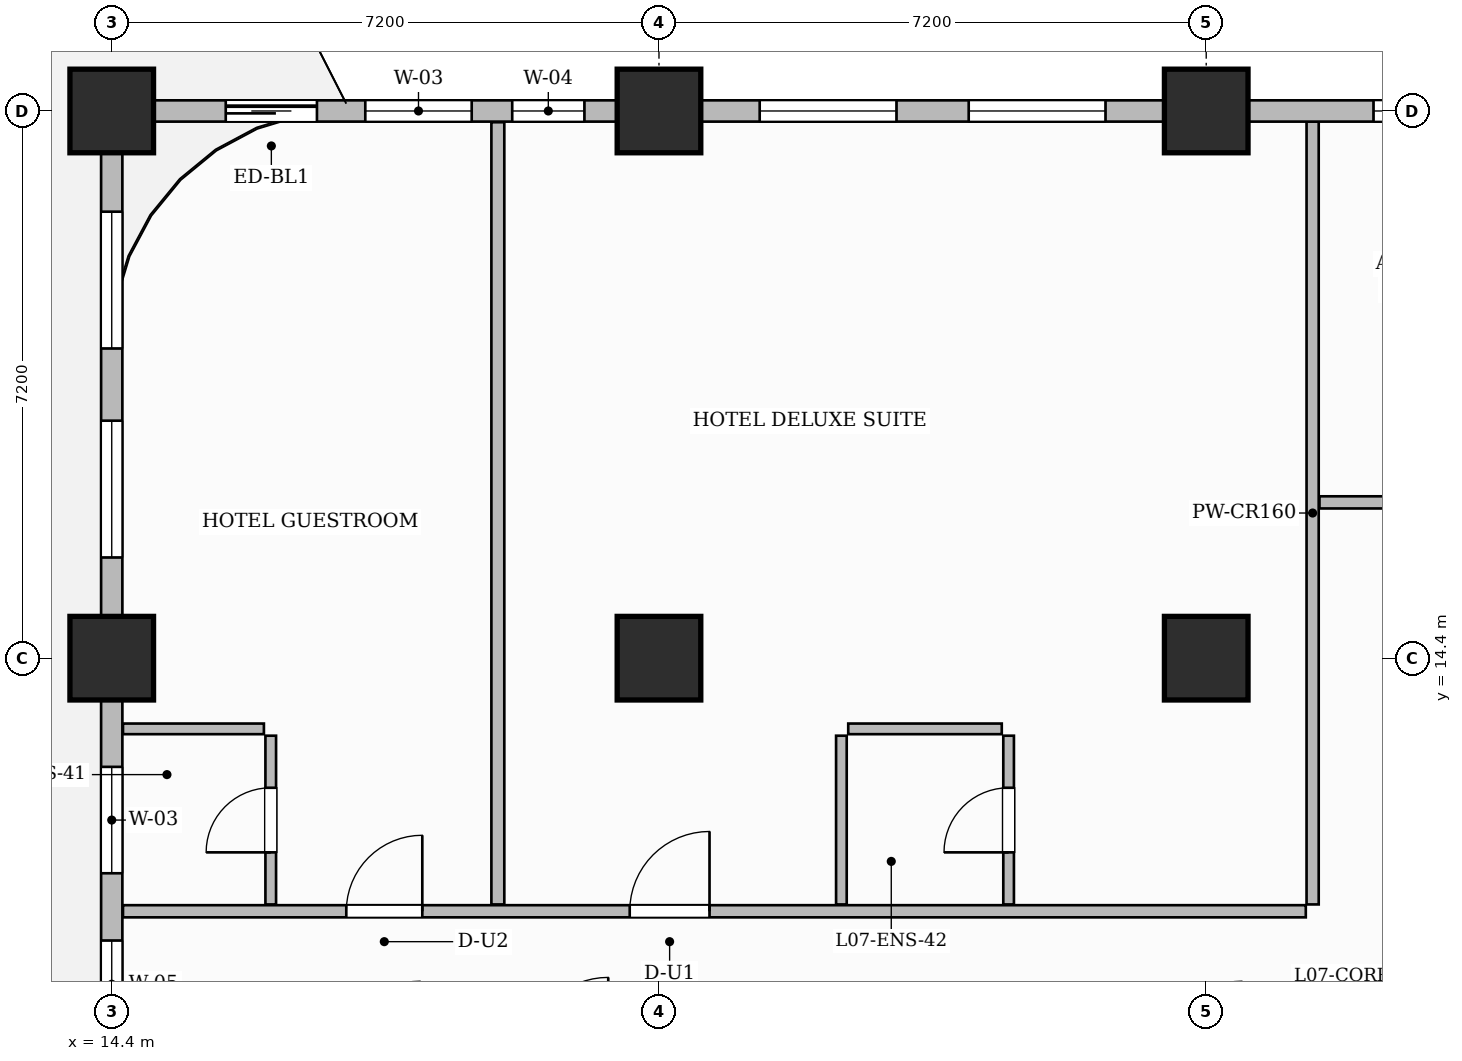
"""IFC4 building model, lengths in metres.
Left out: names, types, materials, properties, quantities, classifications, styles, units other than length and angle.
Written with IfcOpenShell. Run it as: python <this file> out.ifc"""

import sys

from ifc_helpers import new_model, si_unit, direction, frame, frame_2d, origin, origin_2d, place, context, subcontext, project, spatial, rectangle, extrude, source, transform, mapped, element, fill, save


model = new_model("IFC4")
c1 = context("Model", 3, precision=1e-05, world=origin(), true_north=direction((0.0, 1.0)))
c2 = subcontext(c1, "Body", "Model", "MODEL_VIEW")
j1 = project(units=[si_unit("LENGTHUNIT", "METRE"), si_unit("PLANEANGLEUNIT", "RADIAN")], contexts=[c1])
p1 = place(None, origin())
s1 = spatial("IfcSite", under=j1, at=p1, CompositionType="ELEMENT")
p2 = place(p1, origin())
s2 = spatial("IfcBuilding", under=s1, at=p2, CompositionType="ELEMENT")
p3 = place(p2, frame((0.0, 0.0, 36.1)))
s3 = spatial("IfcBuildingStorey", under=s2, at=p3, CompositionType="ELEMENT", Elevation=36.1)
m1 = source(origin(), c2, "Body", "SweptSolid", [
    extrude(rectangle(XDim=1.1, YDim=1.1, at=origin_2d()), origin(), (0.0, 0.0, 1.0), 3.7),
])
for number, where, z_axis, x_axis in (
    (1, (14.4, 14.4, 0.0), (0.0, 0.0, 1.0), (1.0, 0.0, 0.0)),
    (2, (14.4, 21.6, 0.0), (0.0, 0.0, 1.0), (1.0, 0.0, 0.0)),
    (3, (21.6, 14.4, 0.0), (0.0, 0.0, 1.0), (1.0, 0.0, 0.0)),
    (4, (21.6, 21.6, 0.0), (0.0, 0.0, 1.0), (1.0, 0.0, 0.0)),
    (5, (28.8, 14.4, 0.0), (0.0, 0.0, 1.0), (1.0, 0.0, 0.0)),
    (6, (28.8, 21.6, 0.0), (0.0, 0.0, 1.0), (1.0, 0.0, 0.0)),
):
    element("IfcColumn", number, at=place(p3, frame(where, z_axis=z_axis, x_axis=x_axis)), inside=s3, PredefinedType="COLUMN", context=c2, shape_type="MappedRepresentation", body=[
        mapped(m1, transform((0.0, 0.0, 0.0), scale=1.0)),
    ])
p4 = place(p3, frame((14.548, 11.07, 0.0), z_axis=(0.0, 0.0, 1.0), x_axis=(1.0, 0.0, 0.0)))
e7 = element("IfcWall", 7, at=p4, inside=s3, PredefinedType="PARTITIONING", context=c2, shape_type="SweptSolid", body=[
    extrude(rectangle(XDim=15.562, YDim=0.16, at=frame_2d((7.781, 0.0))), origin(), (0.0, 0.0, 1.0), 3.45),
])
p5 = place(p4, frame((2.938, 0.0, 0.0)))
e8 = element("IfcOpeningElement", 8, at=p5, cuts=e7, PredefinedType="OPENING", context=c2, shape_type="SweptSolid", body=[
    extrude(rectangle(XDim=1.0, YDim=2.2, at=frame_2d((0.5, 1.1))), frame((0.0, 0.09, 0.0), z_axis=(0.0, -1.0, 0.0), x_axis=(1.0, 0.0, 0.0)), (0.0, 0.0, 1.0), 0.18),
])
p6 = place(p4, frame((6.667, 0.0, 0.0)))
e9 = element("IfcOpeningElement", 9, at=p6, cuts=e7, PredefinedType="OPENING", context=c2, shape_type="SweptSolid", body=[
    extrude(rectangle(XDim=1.05, YDim=2.25, at=frame_2d((0.525, 1.125))), frame((0.0, 0.09, 0.0), z_axis=(0.0, -1.0, 0.0), x_axis=(1.0, 0.0, 0.0)), (0.0, 0.0, 1.0), 0.18),
])
p7 = place(p3, frame((30.2, 11.16, 0.0), z_axis=(0.0, 0.0, 1.0), x_axis=(0.0, 1.0, 0.0)))
e10 = element("IfcWall", 10, at=p7, inside=s3, PredefinedType="PARTITIONING", context=c2, shape_type="SweptSolid", body=[
    extrude(rectangle(XDim=10.3, YDim=0.16, at=frame_2d((5.15, 0.0))), origin(), (0.0, 0.0, 1.0), 3.45),
])
p8 = place(p3, frame((30.29, 16.45, 0.0), z_axis=(0.0, 0.0, 1.0), x_axis=(1.0, 0.0, 0.0)))
e11 = element("IfcWall", 11, at=p8, inside=s3, PredefinedType="PARTITIONING", context=c2, shape_type="SweptSolid", body=[
    extrude(rectangle(XDim=19.37, YDim=0.16, at=frame_2d((9.685, 0.0))), origin(), (0.0, 0.0, 1.0), 3.45),
])
p9 = place(p8, frame((1.185, 0.0, 0.0)))
e12 = element("IfcOpeningElement", 12, at=p9, cuts=e11, PredefinedType="OPENING", context=c2, shape_type="SweptSolid", body=[
    extrude(rectangle(XDim=0.85, YDim=2.1, at=frame_2d((0.425, 1.05))), frame((0.0, 0.09, 0.0), z_axis=(0.0, -1.0, 0.0), x_axis=(1.0, 0.0, 0.0)), (0.0, 0.0, 1.0), 0.18),
])
p10 = place(p8, frame((6.66, 0.0, 0.0)))
e13 = element("IfcOpeningElement", 13, at=p10, cuts=e11, PredefinedType="OPENING", context=c2, shape_type="SweptSolid", body=[
    extrude(rectangle(XDim=0.9, YDim=2.15, at=frame_2d((0.45, 1.075))), frame((0.0, 0.09, 0.0), z_axis=(0.0, -1.0, 0.0), x_axis=(1.0, 0.0, 0.0)), (0.0, 0.0, 1.0), 0.18),
])
p11 = place(p8, frame((14.46, 0.0, 0.0)))
e14 = element("IfcOpeningElement", 14, at=p11, cuts=e11, PredefinedType="OPENING", context=c2, shape_type="SweptSolid", body=[
    extrude(rectangle(XDim=1.4, YDim=2.35, at=frame_2d((0.7, 1.175))), frame((0.0, 0.09, 0.0), z_axis=(0.0, -1.0, 0.0), x_axis=(1.0, 0.0, 0.0)), (0.0, 0.0, 1.0), 0.18),
])
p12 = place(p3, frame((19.48, 11.16, 0.0), z_axis=(0.0, 0.0, 1.0), x_axis=(0.0, 1.0, 0.0)))
e15 = element("IfcWall", 15, at=p12, inside=s3, PredefinedType="PARTITIONING", context=c2, shape_type="SweptSolid", body=[
    extrude(rectangle(XDim=10.292, YDim=0.17, at=frame_2d((5.146, 0.0))), origin(), (0.0, 0.0, 1.0), 3.45),
])
p13 = place(p3, frame((16.492, 11.16, 0.0), z_axis=(0.0, 0.0, 1.0), x_axis=(0.0, 1.0, 0.0)))
e16 = element("IfcWall", 16, at=p13, inside=s3, PredefinedType="PARTITIONING", context=c2, shape_type="SweptSolid", body=[
    extrude(rectangle(XDim=2.22, YDim=0.14, at=frame_2d((1.11, 0.0))), origin(), (0.0, 0.0, 1.0), 3.45),
])
p14 = place(p13, frame((0.685, 0.0, 0.0)))
e17 = element("IfcOpeningElement", 17, at=p14, cuts=e16, PredefinedType="OPENING", context=c2, shape_type="SweptSolid", body=[
    extrude(rectangle(XDim=0.85, YDim=2.1, at=frame_2d((0.425, 1.05))), frame((0.0, 0.08, 0.0), z_axis=(0.0, -1.0, 0.0), x_axis=(1.0, 0.0, 0.0)), (0.0, 0.0, 1.0), 0.16),
])
p15 = place(p3, frame((14.548, 13.47, 0.0), z_axis=(0.0, 0.0, 1.0), x_axis=(1.0, 0.0, 0.0)))
e18 = element("IfcWall", 18, at=p15, inside=s3, PredefinedType="PARTITIONING", context=c2, shape_type="SweptSolid", body=[
    extrude(rectangle(XDim=1.854, YDim=0.14, at=frame_2d((0.927, 0.0))), origin(), (0.0, 0.0, 1.0), 3.45),
])
p16 = place(p3, frame((24.0, 11.16, 0.0), z_axis=(0.0, 0.0, 1.0), x_axis=(0.0, 1.0, 0.0)))
e19 = element("IfcWall", 19, at=p16, inside=s3, PredefinedType="PARTITIONING", context=c2, shape_type="SweptSolid", body=[
    extrude(rectangle(XDim=2.22, YDim=0.14, at=frame_2d((1.11, 0.0))), origin(), (0.0, 0.0, 1.0), 3.45),
])
p17 = place(p3, frame((26.2, 11.16, 0.0), z_axis=(0.0, 0.0, 1.0), x_axis=(0.0, 1.0, 0.0)))
e20 = element("IfcWall", 20, at=p17, inside=s3, PredefinedType="PARTITIONING", context=c2, shape_type="SweptSolid", body=[
    extrude(rectangle(XDim=2.22, YDim=0.14, at=frame_2d((1.11, 0.0))), origin(), (0.0, 0.0, 1.0), 3.45),
])
p18 = place(p17, frame((0.685, 0.0, 0.0)))
e21 = element("IfcOpeningElement", 21, at=p18, cuts=e20, PredefinedType="OPENING", context=c2, shape_type="SweptSolid", body=[
    extrude(rectangle(XDim=0.85, YDim=2.1, at=frame_2d((0.425, 1.05))), frame((0.0, 0.08, 0.0), z_axis=(0.0, -1.0, 0.0), x_axis=(1.0, 0.0, 0.0)), (0.0, 0.0, 1.0), 0.16),
])
p19 = place(p3, frame((24.09, 13.47, 0.0), z_axis=(0.0, 0.0, 1.0), x_axis=(1.0, 0.0, 0.0)))
e22 = element("IfcWall", 22, at=p19, inside=s3, PredefinedType="PARTITIONING", context=c2, shape_type="SweptSolid", body=[
    extrude(rectangle(XDim=2.02, YDim=0.14, at=frame_2d((1.01, 0.0))), origin(), (0.0, 0.0, 1.0), 3.45),
])
p20 = place(p3, frame((14.4, 21.6, 0.0), z_axis=(0.0, 0.0, 1.0), x_axis=(1.0, 0.0, 0.0)))
e23 = element("IfcWall", 23, at=p20, inside=s3, PredefinedType="SOLIDWALL", context=c2, shape_type="SweptSolid", body=[
    extrude(rectangle(XDim=43.2, YDim=0.28, at=frame_2d((21.6, 0.0))), origin(), (0.0, 0.0, 1.0), 2.885),
])
p21 = place(p20, frame((1.5, 0.0, 0.0)))
e24 = element("IfcOpeningElement", 24, at=p21, cuts=e23, PredefinedType="OPENING", context=c2, shape_type="SweptSolid", body=[
    extrude(rectangle(XDim=1.2, YDim=2.2, at=frame_2d((0.6, 1.1))), frame((0.0, 0.15, 0.0), z_axis=(0.0, -1.0, 0.0), x_axis=(1.0, 0.0, 0.0)), (0.0, 0.0, 1.0), 0.3),
])
p22 = place(p20, frame((3.336, 0.0, 0.8)))
e25 = element("IfcOpeningElement", 25, at=p22, cuts=e23, PredefinedType="OPENING", context=c2, shape_type="SweptSolid", body=[
    extrude(rectangle(XDim=1.4, YDim=1.85, at=frame_2d((0.7, 0.925))), frame((0.0, 0.15, 0.0), z_axis=(0.0, -1.0, 0.0), x_axis=(1.0, 0.0, 0.0)), (0.0, 0.0, 1.0), 0.3),
])
p23 = place(p20, frame((5.269, 0.0, 0.8)))
e26 = element("IfcOpeningElement", 26, at=p23, cuts=e23, PredefinedType="OPENING", context=c2, shape_type="SweptSolid", body=[
    extrude(rectangle(XDim=0.95, YDim=1.75, at=frame_2d((0.475, 0.875))), frame((0.0, 0.15, 0.0), z_axis=(0.0, -1.0, 0.0), x_axis=(1.0, 0.0, 0.0)), (0.0, 0.0, 1.0), 0.3),
])
p24 = place(p20, frame((8.525, 0.0, 0.8)))
e27 = element("IfcOpeningElement", 27, at=p24, cuts=e23, PredefinedType="OPENING", context=c2, shape_type="SweptSolid", body=[
    extrude(rectangle(XDim=1.8, YDim=1.85, at=frame_2d((0.9, 0.925))), frame((0.0, 0.15, 0.0), z_axis=(0.0, -1.0, 0.0), x_axis=(1.0, 0.0, 0.0)), (0.0, 0.0, 1.0), 0.3),
])
p25 = place(p20, frame((11.275, 0.0, 0.8)))
e28 = element("IfcOpeningElement", 28, at=p25, cuts=e23, PredefinedType="OPENING", context=c2, shape_type="SweptSolid", body=[
    extrude(rectangle(XDim=1.8, YDim=1.85, at=frame_2d((0.9, 0.925))), frame((0.0, 0.15, 0.0), z_axis=(0.0, -1.0, 0.0), x_axis=(1.0, 0.0, 0.0)), (0.0, 0.0, 1.0), 0.3),
])
p26 = place(p20, frame((16.601, 0.0, 0.8)))
e29 = element("IfcOpeningElement", 29, at=p26, cuts=e23, PredefinedType="OPENING", context=c2, shape_type="SweptSolid", body=[
    extrude(rectangle(XDim=1.8, YDim=1.85, at=frame_2d((0.9, 0.925))), frame((0.0, 0.15, 0.0), z_axis=(0.0, -1.0, 0.0), x_axis=(1.0, 0.0, 0.0)), (0.0, 0.0, 1.0), 0.3),
])
p27 = place(p20, frame((21.723, 0.0, 0.8)))
e30 = element("IfcOpeningElement", 30, at=p27, cuts=e23, PredefinedType="OPENING", context=c2, shape_type="SweptSolid", body=[
    extrude(rectangle(XDim=1.8, YDim=1.85, at=frame_2d((0.9, 0.925))), frame((0.0, 0.15, 0.0), z_axis=(0.0, -1.0, 0.0), x_axis=(1.0, 0.0, 0.0)), (0.0, 0.0, 1.0), 0.3),
])
p28 = place(p20, frame((24.469, 0.0, 0.8)))
e31 = element("IfcOpeningElement", 31, at=p28, cuts=e23, PredefinedType="OPENING", context=c2, shape_type="SweptSolid", body=[
    extrude(rectangle(XDim=1.8, YDim=1.85, at=frame_2d((0.9, 0.925))), frame((0.0, 0.15, 0.0), z_axis=(0.0, -1.0, 0.0), x_axis=(1.0, 0.0, 0.0)), (0.0, 0.0, 1.0), 0.3),
])
p29 = place(p20, frame((29.075, 0.0, 0.8)))
e32 = element("IfcOpeningElement", 32, at=p29, cuts=e23, PredefinedType="OPENING", context=c2, shape_type="SweptSolid", body=[
    extrude(rectangle(XDim=1.8, YDim=1.85, at=frame_2d((0.9, 0.925))), frame((0.0, 0.15, 0.0), z_axis=(0.0, -1.0, 0.0), x_axis=(1.0, 0.0, 0.0)), (0.0, 0.0, 1.0), 0.3),
])
p30 = place(p20, frame((32.125, 0.0, 0.8)))
e33 = element("IfcOpeningElement", 33, at=p30, cuts=e23, PredefinedType="OPENING", context=c2, shape_type="SweptSolid", body=[
    extrude(rectangle(XDim=1.8, YDim=1.85, at=frame_2d((0.9, 0.925))), frame((0.0, 0.15, 0.0), z_axis=(0.0, -1.0, 0.0), x_axis=(1.0, 0.0, 0.0)), (0.0, 0.0, 1.0), 0.3),
])
p31 = place(p20, frame((36.875, 0.0, 0.8)))
e34 = element("IfcOpeningElement", 34, at=p31, cuts=e23, PredefinedType="OPENING", context=c2, shape_type="SweptSolid", body=[
    extrude(rectangle(XDim=1.8, YDim=1.85, at=frame_2d((0.9, 0.925))), frame((0.0, 0.15, 0.0), z_axis=(0.0, -1.0, 0.0), x_axis=(1.0, 0.0, 0.0)), (0.0, 0.0, 1.0), 0.3),
])
p32 = place(p20, frame((39.925, 0.0, 0.8)))
e35 = element("IfcOpeningElement", 35, at=p32, cuts=e23, PredefinedType="OPENING", context=c2, shape_type="SweptSolid", body=[
    extrude(rectangle(XDim=1.8, YDim=1.85, at=frame_2d((0.9, 0.925))), frame((0.0, 0.15, 0.0), z_axis=(0.0, -1.0, 0.0), x_axis=(1.0, 0.0, 0.0)), (0.0, 0.0, 1.0), 0.3),
])
p33 = place(p3, frame((14.4, 0.05, 0.0), z_axis=(0.0, 0.0, 1.0), x_axis=(0.0, 1.0, 0.0)))
e36 = element("IfcWall", 36, at=p33, inside=s3, PredefinedType="SOLIDWALL", context=c2, shape_type="SweptSolid", body=[
    extrude(rectangle(XDim=21.5, YDim=0.28, at=frame_2d((10.75, 0.0))), origin(), (0.0, 0.0, 1.0), 2.885),
])
p34 = place(p33, frame((1.275, 0.0, 0.8)))
e37 = element("IfcOpeningElement", 37, at=p34, cuts=e36, PredefinedType="OPENING", context=c2, shape_type="SweptSolid", body=[
    extrude(rectangle(XDim=1.8, YDim=1.85, at=frame_2d((0.9, 0.925))), frame((0.0, 0.15, 0.0), z_axis=(0.0, -1.0, 0.0), x_axis=(1.0, 0.0, 0.0)), (0.0, 0.0, 1.0), 0.3),
])
p35 = place(p33, frame((4.025, 0.0, 0.8)))
e38 = element("IfcOpeningElement", 38, at=p35, cuts=e36, PredefinedType="OPENING", context=c2, shape_type="SweptSolid", body=[
    extrude(rectangle(XDim=1.8, YDim=1.85, at=frame_2d((0.9, 0.925))), frame((0.0, 0.15, 0.0), z_axis=(0.0, -1.0, 0.0), x_axis=(1.0, 0.0, 0.0)), (0.0, 0.0, 1.0), 0.3),
])
p36 = place(p33, frame((9.485, 0.0, 0.8)))
e39 = element("IfcOpeningElement", 39, at=p36, cuts=e36, PredefinedType="OPENING", context=c2, shape_type="SweptSolid", body=[
    extrude(rectangle(XDim=1.15, YDim=1.8, at=frame_2d((0.575, 0.9))), frame((0.0, 0.15, 0.0), z_axis=(0.0, -1.0, 0.0), x_axis=(1.0, 0.0, 0.0)), (0.0, 0.0, 1.0), 0.3),
])
p37 = place(p33, frame((11.52, 0.0, 0.8)))
e40 = element("IfcOpeningElement", 40, at=p37, cuts=e36, PredefinedType="OPENING", context=c2, shape_type="SweptSolid", body=[
    extrude(rectangle(XDim=1.4, YDim=1.85, at=frame_2d((0.7, 0.925))), frame((0.0, 0.15, 0.0), z_axis=(0.0, -1.0, 0.0), x_axis=(1.0, 0.0, 0.0)), (0.0, 0.0, 1.0), 0.3),
])
p38 = place(p33, frame((15.675, 0.0, 0.8)))
e41 = element("IfcOpeningElement", 41, at=p38, cuts=e36, PredefinedType="OPENING", context=c2, shape_type="SweptSolid", body=[
    extrude(rectangle(XDim=1.8, YDim=1.85, at=frame_2d((0.9, 0.925))), frame((0.0, 0.15, 0.0), z_axis=(0.0, -1.0, 0.0), x_axis=(1.0, 0.0, 0.0)), (0.0, 0.0, 1.0), 0.3),
])
p39 = place(p33, frame((18.425, 0.0, 0.8)))
e42 = element("IfcOpeningElement", 42, at=p39, cuts=e36, PredefinedType="OPENING", context=c2, shape_type="SweptSolid", body=[
    extrude(rectangle(XDim=1.8, YDim=1.85, at=frame_2d((0.9, 0.925))), frame((0.0, 0.15, 0.0), z_axis=(0.0, -1.0, 0.0), x_axis=(1.0, 0.0, 0.0)), (0.0, 0.0, 1.0), 0.3),
])
m2 = source(origin(), c2, "Body", "SweptSolid", [
    extrude(rectangle(XDim=0.85, YDim=2.1, at=frame_2d((0.425, 1.05))), frame((0.0, 0.025, 0.0), z_axis=(0.0, -1.0, 0.0), x_axis=(1.0, 0.0, 0.0)), (0.0, 0.0, 1.0), 0.05),
])
p40 = place(p14, origin())
e43 = element("IfcDoor", 43, at=p40, inside=s3, OperationType="SINGLE_SWING_LEFT", PredefinedType="DOOR", context=c2, shape_type="MappedRepresentation", body=[
    mapped(m2, transform((0.0, 0.0, 0.0), scale=1.0)),
])
fill(e17, e43)
m3 = source(origin(), c2, "Body", "SweptSolid", [
    extrude(rectangle(XDim=1.0, YDim=2.2, at=frame_2d((0.5, 1.1))), frame((0.0, 0.025, 0.0), z_axis=(0.0, -1.0, 0.0), x_axis=(1.0, 0.0, 0.0)), (0.0, 0.0, 1.0), 0.05),
])
p41 = place(p5, origin())
e44 = element("IfcDoor", 44, at=p41, inside=s3, OperationType="SINGLE_SWING_RIGHT", PredefinedType="DOOR", context=c2, shape_type="MappedRepresentation", body=[
    mapped(m3, transform((0.0, 0.0, 0.0), scale=1.0)),
])
fill(e8, e44)
p42 = place(p18, origin())
e45 = element("IfcDoor", 45, at=p42, inside=s3, OperationType="SINGLE_SWING_LEFT", PredefinedType="DOOR", context=c2, shape_type="MappedRepresentation", body=[
    mapped(m2, transform((0.0, 0.0, 0.0), scale=1.0)),
])
fill(e21, e45)
m4 = source(origin(), c2, "Body", "SweptSolid", [
    extrude(rectangle(XDim=1.05, YDim=2.25, at=frame_2d((0.525, 1.125))), frame((0.0, 0.025, 0.0), z_axis=(0.0, -1.0, 0.0), x_axis=(1.0, 0.0, 0.0)), (0.0, 0.0, 1.0), 0.05),
])
p43 = place(p6, origin())
e46 = element("IfcDoor", 46, at=p43, inside=s3, OperationType="SINGLE_SWING_RIGHT", PredefinedType="DOOR", context=c2, shape_type="MappedRepresentation", body=[
    mapped(m4, transform((0.0, 0.0, 0.0), scale=1.0)),
])
fill(e9, e46)
m5 = source(origin(), c2, "Body", "SweptSolid", [
    extrude(rectangle(XDim=1.2, YDim=2.2, at=frame_2d((0.6, 1.1))), frame((0.0, 0.025, 0.0), z_axis=(0.0, -1.0, 0.0), x_axis=(1.0, 0.0, 0.0)), (0.0, 0.0, 1.0), 0.05),
])
p44 = place(p21, origin())
e47 = element("IfcDoor", 47, at=p44, inside=s3, OperationType="SLIDING_TO_LEFT", PredefinedType="DOOR", context=c2, shape_type="MappedRepresentation", body=[
    mapped(m5, transform((0.0, 0.0, 0.0), scale=1.0)),
])
fill(e24, e47)
m6 = source(origin(), c2, "Body", "SweptSolid", [
    extrude(rectangle(XDim=1.4, YDim=1.85, at=frame_2d((0.7, 0.925))), frame((0.0, 0.03, 0.0), z_axis=(0.0, -1.0, 0.0), x_axis=(1.0, 0.0, 0.0)), (0.0, 0.0, 1.0), 0.06),
])
p45 = place(p22, origin())
e48 = element("IfcWindow", 48, at=p45, inside=s3, PartitioningType="SINGLE_PANEL", PredefinedType="WINDOW", context=c2, shape_type="MappedRepresentation", body=[
    mapped(m6, transform((0.0, 0.0, 0.0), scale=1.0)),
])
fill(e25, e48)
m7 = source(origin(), c2, "Body", "SweptSolid", [
    extrude(rectangle(XDim=0.95, YDim=1.75, at=frame_2d((0.475, 0.875))), frame((0.0, 0.03, 0.0), z_axis=(0.0, -1.0, 0.0), x_axis=(1.0, 0.0, 0.0)), (0.0, 0.0, 1.0), 0.06),
])
p46 = place(p23, origin())
e49 = element("IfcWindow", 49, at=p46, inside=s3, PartitioningType="SINGLE_PANEL", PredefinedType="WINDOW", context=c2, shape_type="MappedRepresentation", body=[
    mapped(m7, transform((0.0, 0.0, 0.0), scale=1.0)),
])
fill(e26, e49)
m8 = source(origin(), c2, "Body", "SweptSolid", [
    extrude(rectangle(XDim=1.8, YDim=1.85, at=frame_2d((0.9, 0.925))), frame((0.0, 0.03, 0.0), z_axis=(0.0, -1.0, 0.0), x_axis=(1.0, 0.0, 0.0)), (0.0, 0.0, 1.0), 0.06),
])
p47 = place(p24, origin())
e50 = element("IfcWindow", 50, at=p47, inside=s3, PartitioningType="DOUBLE_PANEL_VERTICAL", PredefinedType="WINDOW", context=c2, shape_type="MappedRepresentation", body=[
    mapped(m8, transform((0.0, 0.0, 0.0), scale=1.0)),
])
fill(e27, e50)
p48 = place(p25, origin())
e51 = element("IfcWindow", 51, at=p48, inside=s3, PartitioningType="DOUBLE_PANEL_VERTICAL", PredefinedType="WINDOW", context=c2, shape_type="MappedRepresentation", body=[
    mapped(m8, transform((0.0, 0.0, 0.0), scale=1.0)),
])
fill(e28, e51)
p49 = place(p26, origin())
e52 = element("IfcWindow", 52, at=p49, inside=s3, PartitioningType="DOUBLE_PANEL_VERTICAL", PredefinedType="WINDOW", context=c2, shape_type="MappedRepresentation", body=[
    mapped(m8, transform((0.0, 0.0, 0.0), scale=1.0)),
])
fill(e29, e52)
m9 = source(origin(), c2, "Body", "SweptSolid", [
    extrude(rectangle(XDim=1.15, YDim=1.8, at=frame_2d((0.575, 0.9))), frame((0.0, 0.03, 0.0), z_axis=(0.0, -1.0, 0.0), x_axis=(1.0, 0.0, 0.0)), (0.0, 0.0, 1.0), 0.06),
])
p50 = place(p36, origin())
e53 = element("IfcWindow", 53, at=p50, inside=s3, PartitioningType="SINGLE_PANEL", PredefinedType="WINDOW", context=c2, shape_type="MappedRepresentation", body=[
    mapped(m9, transform((0.0, 0.0, 0.0), scale=1.0)),
])
fill(e39, e53)
p51 = place(p37, origin())
e54 = element("IfcWindow", 54, at=p51, inside=s3, PartitioningType="SINGLE_PANEL", PredefinedType="WINDOW", context=c2, shape_type="MappedRepresentation", body=[
    mapped(m6, transform((0.0, 0.0, 0.0), scale=1.0)),
])
fill(e40, e54)
p52 = place(p38, origin())
e55 = element("IfcWindow", 55, at=p52, inside=s3, PartitioningType="DOUBLE_PANEL_VERTICAL", PredefinedType="WINDOW", context=c2, shape_type="MappedRepresentation", body=[
    mapped(m8, transform((0.0, 0.0, 0.0), scale=1.0)),
])
fill(e41, e55)
p53 = place(p39, origin())
e56 = element("IfcWindow", 56, at=p53, inside=s3, PartitioningType="DOUBLE_PANEL_VERTICAL", PredefinedType="WINDOW", context=c2, shape_type="MappedRepresentation", body=[
    mapped(m8, transform((0.0, 0.0, 0.0), scale=1.0)),
])
fill(e42, e56)
save(model, sys.argv[1])
